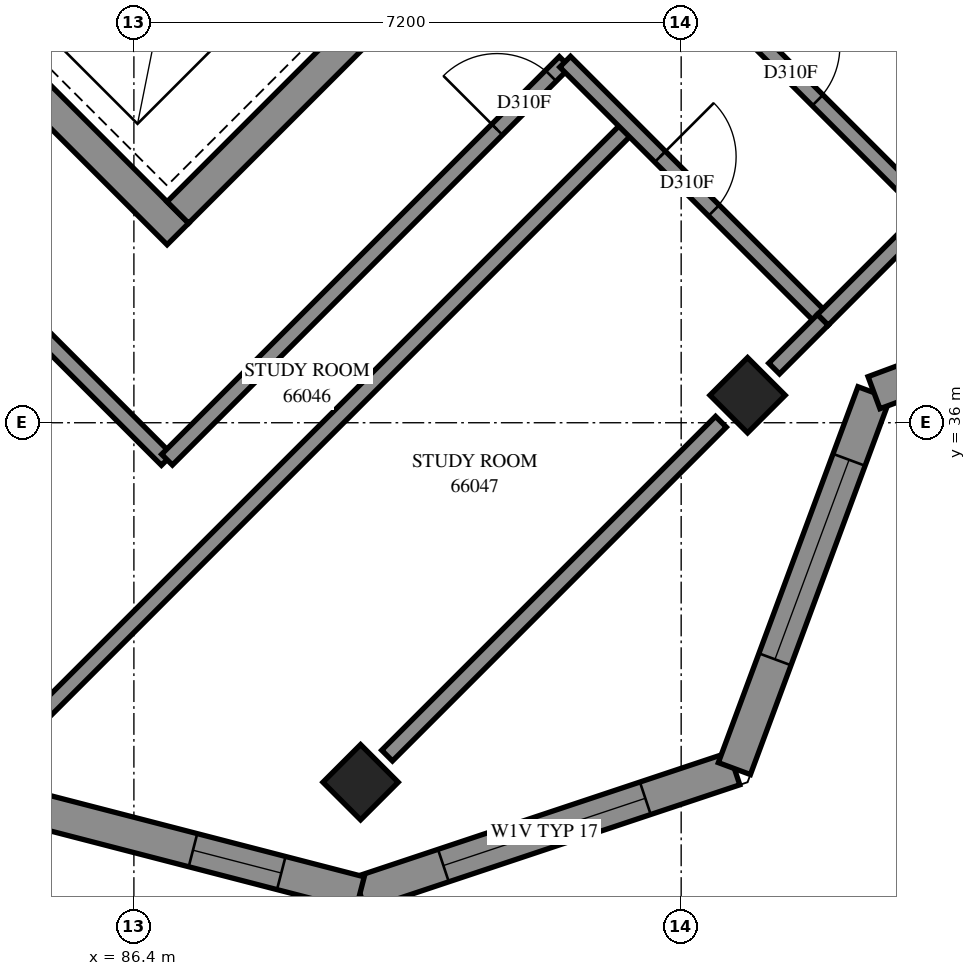
"""IFC4 building model, lengths in metres.
Left out: names, types, materials, properties, quantities, classifications, styles, units other than length and angle.
Written with IfcOpenShell. Run it as: python <this file> out.ifc"""

import sys

from ifc_helpers import new_model, si_unit, direction, frame, frame_2d, origin, origin_2d, place, context, subcontext, project, spatial, polyline, rectangle, outline, extrude, element, fill, save


model = new_model("IFC4")
c1 = context("Model", 3, precision=1e-05, world=origin(), true_north=direction((0.0, 1.0)))
c2 = subcontext(c1, "Body", "Model", "MODEL_VIEW")
j1 = project(units=[si_unit("LENGTHUNIT", "METRE"), si_unit("PLANEANGLEUNIT", "RADIAN")], contexts=[c1])
p1 = place(None, origin())
s1 = spatial("IfcSite", under=j1, at=p1, CompositionType="ELEMENT")
p2 = place(p1, origin())
s2 = spatial("IfcBuilding", under=s1, at=p2, CompositionType="ELEMENT")
p3 = place(p2, frame((0.0, 0.0, 243.8)))
s3 = spatial("IfcBuildingStorey", under=s2, at=p3, CompositionType="ELEMENT", Elevation=243.8)
for number, where, z_axis, x_axis in (
    (1, (94.474, 36.362, 0.0), (0.0, 0.0, 1.0), (0.707, -0.707, 0.0)),
    (2, (89.382, 31.271, 0.0), (0.0, 0.0, 1.0), (0.707, -0.707, 0.0)),
):
    element("IfcColumn", number, at=place(p3, frame(where, z_axis=z_axis, x_axis=x_axis)), inside=s3, PredefinedType="COLUMN", context=c2, shape_type="SweptSolid", body=[
        extrude(rectangle(XDim=0.7, YDim=0.7, at=origin_2d()), origin(), (0.0, 0.0, 1.0), 3.1),
    ])
p4 = place(p3, frame((76.23, 49.231, -0.3), z_axis=(0.0, 0.0, 1.0), x_axis=(0.7071034917, -0.7071100706, 0.0)))
e3 = element("IfcWall", 3, at=p4, inside=s3, PredefinedType="SHEAR", context=c2, shape_type="SweptSolid", body=[
    extrude(rectangle(XDim=15.2, YDim=0.4, at=frame_2d((7.6, 0.0))), origin(), (0.0, 0.0, 1.0), 2.7),
])
p5 = place(p3, frame((86.978, 38.766, -0.3), z_axis=(0.0, 0.0, 1.0), x_axis=(0.7071067812, 0.7071067812, 0.0)))
e4 = element("IfcWall", 4, at=p5, inside=s3, PredefinedType="SHEAR", context=c2, shape_type="SweptSolid", body=[
    extrude(rectangle(XDim=14.4, YDim=0.4, at=frame_2d((7.2, 0.0))), origin(), (0.0, 0.0, 1.0), 2.7),
])
p6 = place(p5, frame((4.55, 0.0, 0.3)))
e5 = element("IfcOpeningElement", 5, at=p6, cuts=e4, PredefinedType="OPENING", context=c2, shape_type="SweptSolid", body=[
    extrude(rectangle(XDim=1.1, YDim=2.1, at=frame_2d((0.55, 1.05))), frame((0.0, 0.21, 0.0), z_axis=(0.0, -1.0, 0.0), x_axis=(1.0, 0.0, 0.0)), (0.0, 0.0, 1.0), 0.42),
])
p7 = place(p5, frame((11.35, 0.0, 0.3)))
e6 = element("IfcOpeningElement", 6, at=p7, cuts=e4, PredefinedType="OPENING", context=c2, shape_type="SweptSolid", body=[
    extrude(rectangle(XDim=1.1, YDim=2.1, at=frame_2d((0.55, 1.05))), frame((0.0, 0.21, 0.0), z_axis=(0.0, -1.0, 0.0), x_axis=(1.0, 0.0, 0.0)), (0.0, 0.0, 1.0), 0.42),
])
p8 = place(p3, frame((89.374, 29.808, 0.0), z_axis=(0.0, 0.0, 1.0), x_axis=(0.948685224, 0.3162219882, 0.0)))
e7 = element("IfcWall", 7, at=p8, inside=s3, PredefinedType="SOLIDWALL", context=c2, shape_type="SweptSolid", body=[
    extrude(outline(polyline([(-0.067, -0.225), (5.3, -0.225), (5.085, 0.225), (0.067, 0.225), (-0.067, -0.225)])), origin(), (0.0, 0.0, 1.0), 3.1),
])
p9 = place(p8, frame((1.157, 0.0, 0.45)))
e8 = element("IfcOpeningElement", 8, at=p9, cuts=e7, PredefinedType="OPENING", context=c2, shape_type="SweptSolid", body=[
    extrude(rectangle(XDim=2.8, YDim=2.55, at=frame_2d((1.4, 1.275))), frame((0.0, 0.235, 0.0), z_axis=(0.0, -1.0, 0.0), x_axis=(1.0, 0.0, 0.0)), (0.0, 0.0, 1.0), 0.47),
])
p10 = place(p3, frame((94.3, 31.45, 0.0), z_axis=(0.0, 0.0, 1.0), x_axis=(0.3481927166, 0.9374229739, 0.0)))
e9 = element("IfcWall", 9, at=p10, inside=s3, PredefinedType="SOLIDWALL", context=c2, shape_type="SweptSolid", body=[
    extrude(outline(polyline([(-0.108, -0.225), (5.172, -0.225), (5.379, 0.225), (0.108, 0.225), (-0.108, -0.225)])), origin(), (0.0, 0.0, 1.0), 3.1),
])
p11 = place(p10, frame((1.534, 0.0, 0.45)))
e10 = element("IfcOpeningElement", 10, at=p11, cuts=e9, PredefinedType="OPENING", context=c2, shape_type="SweptSolid", body=[
    extrude(rectangle(XDim=2.8, YDim=2.55, at=frame_2d((1.4, 1.275))), frame((0.0, 0.235, 0.0), z_axis=(0.0, -1.0, 0.0), x_axis=(1.0, 0.0, 0.0)), (0.0, 0.0, 1.0), 0.47),
])
p12 = place(p3, frame((96.137, 36.395, 0.0), z_axis=(0.0, 0.0, 1.0), x_axis=(0.937429161, 0.3481760591, 0.0)))
e11 = element("IfcWall", 11, at=p12, inside=s3, PredefinedType="SOLIDWALL", context=c2, shape_type="SweptSolid", body=[
    extrude(outline(polyline([(0.103, -0.225), (5.383, -0.225), (5.168, 0.225), (-0.103, 0.225), (0.103, -0.225)])), origin(), (0.0, 0.0, 1.0), 3.1),
])
p13 = place(p12, frame((1.651, 0.0, 0.45)))
e12 = element("IfcOpeningElement", 12, at=p13, cuts=e11, PredefinedType="OPENING", context=c2, shape_type="SweptSolid", body=[
    extrude(rectangle(XDim=2.8, YDim=2.55, at=frame_2d((1.4, 1.275))), frame((0.0, 0.235, 0.0), z_axis=(0.0, -1.0, 0.0), x_axis=(1.0, 0.0, 0.0)), (0.0, 0.0, 1.0), 0.47),
])
p14 = place(p3, frame((84.983, 30.944, 0.0), z_axis=(0.0, 0.0, 1.0), x_axis=(0.9681259004, -0.2504640514, 0.0)))
e13 = element("IfcWall", 13, at=p14, inside=s3, PredefinedType="SOLIDWALL", context=c2, shape_type="SweptSolid", body=[
    extrude(outline(polyline([(-0.127, -0.225), (4.603, -0.225), (4.469, 0.225), (0.127, 0.225), (-0.127, -0.225)])), origin(), (0.0, 0.0, 1.0), 3.1),
])
p15 = place(p14, frame((2.267, 0.0, 0.45)))
e14 = element("IfcOpeningElement", 14, at=p15, cuts=e13, PredefinedType="OPENING", context=c2, shape_type="SweptSolid", body=[
    extrude(rectangle(XDim=1.2, YDim=2.55, at=frame_2d((0.6, 1.275))), frame((0.0, 0.235, 0.0), z_axis=(0.0, -1.0, 0.0), x_axis=(1.0, 0.0, 0.0)), (0.0, 0.0, 1.0), 0.47),
])
p16 = place(p3, frame((84.929, 31.91, 0.0), z_axis=(0.0, 0.0, 1.0), x_axis=(0.7071067812, 0.7071067812, 0.0)))
e15 = element("IfcWall", 15, at=p16, inside=s3, PredefinedType="PARTITIONING", context=c2, shape_type="SweptSolid", body=[
    extrude(rectangle(XDim=11.297, YDim=0.2, at=frame_2d((5.649, 0.0))), origin(), (0.0, 0.0, 1.0), 3.1),
])
p17 = place(p3, frame((80.747, 41.597, 0.0), z_axis=(0.0, 0.0, 1.0), x_axis=(0.7071067812, -0.7071067812, 0.0)))
e16 = element("IfcWall", 16, at=p17, inside=s3, PredefinedType="PARTITIONING", context=c2, shape_type="SweptSolid", body=[
    extrude(rectangle(XDim=8.607, YDim=0.2, at=frame_2d((4.303, 0.0))), origin(), (0.0, 0.0, 1.0), 3.1),
])
p18 = place(p17, frame((2.903, 0.0, 0.0)))
e17 = element("IfcOpeningElement", 17, at=p18, cuts=e16, PredefinedType="OPENING", context=c2, shape_type="SweptSolid", body=[
    extrude(rectangle(XDim=1.0, YDim=2.1, at=frame_2d((0.5, 1.05))), frame((0.0, 0.11, 0.0), z_axis=(0.0, -1.0, 0.0), x_axis=(1.0, 0.0, 0.0)), (0.0, 0.0, 1.0), 0.22),
])
p19 = place(p3, frame((86.836, 35.514, 0.0), z_axis=(0.0, 0.0, 1.0), x_axis=(0.7071067812, 0.7071067812, 0.0)))
e18 = element("IfcWall", 18, at=p19, inside=s3, PredefinedType="PARTITIONING", context=c2, shape_type="SweptSolid", body=[
    extrude(rectangle(XDim=7.399, YDim=0.2, at=frame_2d((3.7, 0.0))), origin(), (0.0, 0.0, 1.0), 3.1),
])
p20 = place(p19, frame((6.142, 0.0, 0.0)))
e19 = element("IfcOpeningElement", 19, at=p20, cuts=e18, PredefinedType="OPENING", context=c2, shape_type="SweptSolid", body=[
    extrude(rectangle(XDim=1.0, YDim=2.1, at=frame_2d((0.5, 1.05))), frame((0.0, 0.11, 0.0), z_axis=(0.0, -1.0, 0.0), x_axis=(1.0, 0.0, 0.0)), (0.0, 0.0, 1.0), 0.22),
])
p21 = place(p3, frame((89.731, 31.621, 0.0), z_axis=(0.0, 0.0, 1.0), x_axis=(0.7071067812, 0.7071067812, 0.0)))
e20 = element("IfcWall", 20, at=p21, inside=s3, PredefinedType="PARTITIONING", context=c2, shape_type="SweptSolid", body=[
    extrude(rectangle(XDim=6.211, YDim=0.2, at=frame_2d((3.106, 0.0))), origin(), (0.0, 0.0, 1.0), 2.6),
])
p22 = place(p3, frame((93.481, 42.157, 0.0), z_axis=(0.0, 0.0, 1.0), x_axis=(0.7071067812, -0.7071067812, 0.0)))
e21 = element("IfcWall", 21, at=p22, inside=s3, PredefinedType="PARTITIONING", context=c2, shape_type="SweptSolid", body=[
    extrude(rectangle(XDim=4.8, YDim=0.2, at=frame_2d((2.4, 0.0))), origin(), (0.0, 0.0, 1.0), 3.1),
])
p23 = place(p22, frame((1.707, 0.0, 0.0)))
e22 = element("IfcOpeningElement", 22, at=p23, cuts=e21, PredefinedType="OPENING", context=c2, shape_type="SweptSolid", body=[
    extrude(rectangle(XDim=1.0, YDim=2.1, at=frame_2d((0.5, 1.05))), frame((0.0, 0.11, 0.0), z_axis=(0.0, -1.0, 0.0), x_axis=(1.0, 0.0, 0.0)), (0.0, 0.0, 1.0), 0.22),
])
p24 = place(p3, frame((92.073, 40.749, 0.0), z_axis=(0.0, 0.0, 1.0), x_axis=(0.7071067812, -0.7071067812, 0.0)))
e23 = element("IfcWall", 23, at=p24, inside=s3, PredefinedType="PARTITIONING", context=c2, shape_type="SweptSolid", body=[
    extrude(rectangle(XDim=4.8, YDim=0.2, at=frame_2d((2.4, 0.0))), origin(), (0.0, 0.0, 1.0), 3.1),
])
p25 = place(p24, frame((1.767, 0.0, 0.0)))
e24 = element("IfcOpeningElement", 24, at=p25, cuts=e23, PredefinedType="OPENING", context=c2, shape_type="SweptSolid", body=[
    extrude(rectangle(XDim=1.0, YDim=2.1, at=frame_2d((0.5, 1.05))), frame((0.0, 0.11, 0.0), z_axis=(0.0, -1.0, 0.0), x_axis=(1.0, 0.0, 0.0)), (0.0, 0.0, 1.0), 0.22),
])
p26 = place(p3, frame((95.463, 37.353, 0.0), z_axis=(0.0, 0.0, 1.0), x_axis=(0.7071067812, 0.7071067812, 0.0)))
e25 = element("IfcWall", 25, at=p26, inside=s3, PredefinedType="PARTITIONING", context=c2, shape_type="SweptSolid", body=[
    extrude(rectangle(XDim=2.0, YDim=0.2, at=frame_2d((1.0, 0.0))), origin(), (0.0, 0.0, 1.0), 2.6),
])
p27 = place(p3, frame((94.823, 36.713, 0.0), z_axis=(0.0, 0.0, 1.0), x_axis=(0.7071067812, 0.7071067812, 0.0)))
e26 = element("IfcWall", 26, at=p27, inside=s3, PredefinedType="PARTITIONING", context=c2, shape_type="SweptSolid", body=[
    extrude(rectangle(XDim=0.905, YDim=0.2, at=frame_2d((0.453, 0.0))), origin(), (0.0, 0.0, 1.0), 2.6),
])
p28 = place(p9, origin())
e27 = element("IfcWindow", 27, at=p28, inside=s3, PartitioningType="SINGLE_PANEL", PredefinedType="WINDOW", context=c2, shape_type="SweptSolid", body=[
    extrude(rectangle(XDim=2.8, YDim=2.55, at=frame_2d((1.4, 1.275))), frame((0.0, 0.205, 0.0), z_axis=(0.0, -1.0, 0.0), x_axis=(1.0, 0.0, 0.0)), (0.0, 0.0, 1.0), 0.06),
])
fill(e8, e27)
p29 = place(p11, origin())
e28 = element("IfcWindow", 28, at=p29, inside=s3, PartitioningType="SINGLE_PANEL", PredefinedType="WINDOW", context=c2, shape_type="SweptSolid", body=[
    extrude(rectangle(XDim=2.8, YDim=2.55, at=frame_2d((1.4, 1.275))), frame((0.0, 0.205, 0.0), z_axis=(0.0, -1.0, 0.0), x_axis=(1.0, 0.0, 0.0)), (0.0, 0.0, 1.0), 0.06),
])
fill(e10, e28)
p30 = place(p15, origin())
e29 = element("IfcWindow", 29, at=p30, inside=s3, PartitioningType="SINGLE_PANEL", PredefinedType="WINDOW", context=c2, shape_type="SweptSolid", body=[
    extrude(rectangle(XDim=1.2, YDim=2.55, at=frame_2d((0.6, 1.275))), frame((0.0, 0.205, 0.0), z_axis=(0.0, -1.0, 0.0), x_axis=(1.0, 0.0, 0.0)), (0.0, 0.0, 1.0), 0.06),
])
fill(e14, e29)
p31 = place(p20, origin())
e30 = element("IfcDoor", 30, at=p31, inside=s3, OperationType="SINGLE_SWING_RIGHT", PredefinedType="DOOR", context=c2, shape_type="SweptSolid", body=[
    extrude(rectangle(XDim=1.0, YDim=2.1, at=frame_2d((0.5, 1.05))), frame((0.0, 0.025, 0.0), z_axis=(0.0, -1.0, 0.0), x_axis=(1.0, 0.0, 0.0)), (0.0, 0.0, 1.0), 0.05),
])
fill(e19, e30)
p32 = place(p25, origin())
e31 = element("IfcDoor", 31, at=p32, inside=s3, OperationType="SINGLE_SWING_LEFT", PredefinedType="DOOR", context=c2, shape_type="SweptSolid", body=[
    extrude(rectangle(XDim=1.0, YDim=2.1, at=frame_2d((0.5, 1.05))), frame((0.0, 0.025, 0.0), z_axis=(0.0, -1.0, 0.0), x_axis=(1.0, 0.0, 0.0)), (0.0, 0.0, 1.0), 0.05),
])
fill(e24, e31)
p33 = place(p23, origin())
e32 = element("IfcDoor", 32, at=p33, inside=s3, OperationType="SINGLE_SWING_RIGHT", PredefinedType="DOOR", context=c2, shape_type="SweptSolid", body=[
    extrude(rectangle(XDim=1.0, YDim=2.1, at=frame_2d((0.5, 1.05))), frame((0.0, 0.025, 0.0), z_axis=(0.0, -1.0, 0.0), x_axis=(1.0, 0.0, 0.0)), (0.0, 0.0, 1.0), 0.05),
])
fill(e22, e32)
save(model, sys.argv[1])
